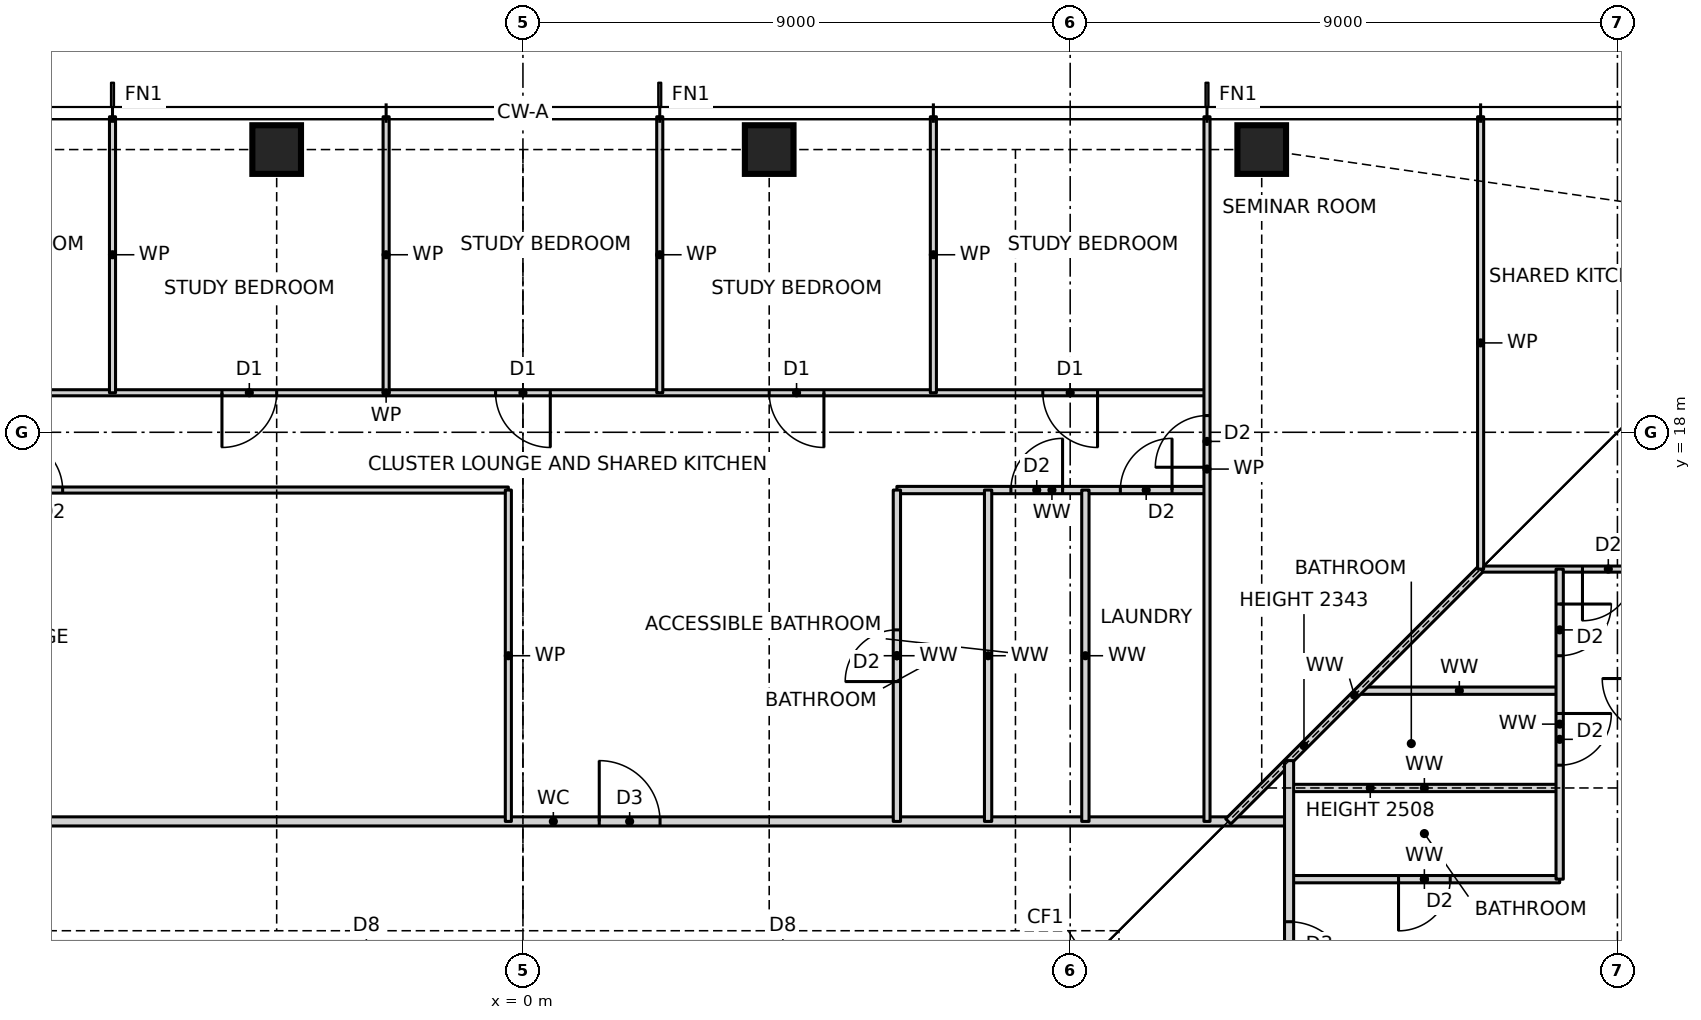
"""IFC4 building model, lengths in metres.
Left out: names, types, materials, properties, quantities, classifications, styles, units other than length and angle.
Written with IfcOpenShell. Run it as: python <this file> out.ifc"""

import sys

from ifc_helpers import new_model, si_unit, direction, frame, frame_2d, origin, origin_2d, place, context, subcontext, project, spatial, rectangle, hollow_rectangle, extrude, element, fill, save


model = new_model("IFC4")
c1 = context("Model", 3, precision=1e-05, world=origin(), true_north=direction((0.0, 1.0)))
c2 = subcontext(c1, "Body", "Model", "MODEL_VIEW")
j1 = project(units=[si_unit("LENGTHUNIT", "METRE"), si_unit("PLANEANGLEUNIT", "RADIAN")], contexts=[c1])
p1 = place(None, origin())
s1 = spatial("IfcSite", under=j1, at=p1, CompositionType="ELEMENT")
p2 = place(p1, origin())
s2 = spatial("IfcBuilding", under=s1, at=p2, CompositionType="ELEMENT")
p3 = place(p2, frame((0.0, 0.0, 29.0)))
s3 = spatial("IfcBuildingStorey", under=s2, at=p3, CompositionType="ELEMENT", Elevation=29.0)
for number, where, z_axis, x_axis in (
    (1, (12.15, 22.65, 0.0), (0.0, 0.0, 1.0), (1.0, 0.0, 0.0)),
    (2, (4.05, 22.65, 0.0), (0.0, 0.0, 1.0), (1.0, 0.0, 0.0)),
    (3, (-4.05, 22.65, 0.0), (0.0, 0.0, 1.0), (1.0, 0.0, 0.0)),
):
    element("IfcColumn", number, at=place(p3, frame(where, z_axis=z_axis, x_axis=x_axis)), inside=s3, PredefinedType="COLUMN", context=c2, shape_type="SweptSolid", body=[
        extrude(hollow_rectangle(XDim=0.8, YDim=0.8, WallThickness=0.09, at=origin_2d()), origin(), (0.0, 0.0, 1.0), 3.5),
    ])
p4 = place(p3, frame((12.6, 10.65, 0.0), z_axis=(0.0, 0.0, 1.0), x_axis=(1.0, 0.0, 0.0)))
e4 = element("IfcWall", 4, at=p4, inside=s3, PredefinedType="PARTITIONING", context=c2, shape_type="SweptSolid", body=[
    extrude(rectangle(XDim=4.45, YDim=0.12, at=frame_2d((2.225, 0.0))), origin(), (0.0, 0.0, 1.0), 3.27),
])
p5 = place(p4, frame((1.8, 0.0, 0.0)))
e5 = element("IfcOpeningElement", 5, at=p5, cuts=e4, PredefinedType="OPENING", context=c2, shape_type="SweptSolid", body=[
    extrude(rectangle(XDim=0.85, YDim=2.1, at=frame_2d((0.425, 1.05))), frame((0.0, 0.07, 0.0), z_axis=(0.0, -1.0, 0.0), x_axis=(1.0, 0.0, 0.0)), (0.0, 0.0, 1.0), 0.14),
])
p6 = place(p3, frame((-11.6, 11.6, 0.0), z_axis=(0.0, 0.0, 1.0), x_axis=(1.0, 0.0, 0.0)))
e6 = element("IfcWall", 6, at=p6, inside=s3, PredefinedType="PARTITIONING", context=c2, shape_type="SweptSolid", body=[
    extrude(rectangle(XDim=24.2, YDim=0.15, at=frame_2d((12.1, 0.0))), origin(), (0.0, 0.0, 1.0), 3.27),
])
p7 = place(p6, frame((12.855, 0.0, 0.0)))
e7 = element("IfcOpeningElement", 7, at=p7, cuts=e6, PredefinedType="OPENING", context=c2, shape_type="SweptSolid", body=[
    extrude(rectangle(XDim=1.0, YDim=2.1, at=frame_2d((0.5, 1.05))), frame((0.0, 0.085, 0.0), z_axis=(0.0, -1.0, 0.0), x_axis=(1.0, 0.0, 0.0)), (0.0, 0.0, 1.0), 0.17),
])
p8 = place(p3, frame((12.6, 12.15, 0.0), z_axis=(0.0, 0.0, 1.0), x_axis=(1.0, 0.0, 0.0)))
e8 = element("IfcWall", 8, at=p8, inside=s3, PredefinedType="PARTITIONING", context=c2, shape_type="SweptSolid", body=[
    extrude(rectangle(XDim=4.45, YDim=0.12, at=frame_2d((2.225, 0.0))), origin(), (0.0, 0.0, 1.0), 2.508),
])
p9 = place(p3, frame((13.75, 13.75, 0.0), z_axis=(0.0, 0.0, 1.0), x_axis=(1.0, 0.0, 0.0)))
e9 = element("IfcWall", 9, at=p9, inside=s3, PredefinedType="PARTITIONING", context=c2, shape_type="SweptSolid", body=[
    extrude(rectangle(XDim=3.3, YDim=0.12, at=frame_2d((1.65, 0.0))), origin(), (0.0, 0.0, 1.0), 3.27),
])
p10 = place(p3, frame((15.75, 15.75, 0.0), z_axis=(0.0, 0.0, 1.0), x_axis=(1.0, 0.0, 0.0)))
e10 = element("IfcWall", 10, at=p10, inside=s3, PredefinedType="PARTITIONING", context=c2, shape_type="SweptSolid", body=[
    extrude(rectangle(XDim=7.44, YDim=0.1, at=frame_2d((3.72, 0.0))), origin(), (0.0, 0.0, 1.0), 3.27),
])
p11 = place(p10, frame((1.675, 0.0, 0.0)))
e11 = element("IfcOpeningElement", 11, at=p11, cuts=e10, PredefinedType="OPENING", context=c2, shape_type="SweptSolid", body=[
    extrude(rectangle(XDim=0.85, YDim=2.1, at=frame_2d((0.425, 1.05))), frame((0.0, 0.06, 0.0), z_axis=(0.0, -1.0, 0.0), x_axis=(1.0, 0.0, 0.0)), (0.0, 0.0, 1.0), 0.12),
])
p12 = place(p3, frame((-15.75, 17.05, 0.0), z_axis=(0.0, 0.0, 1.0), x_axis=(1.0, 0.0, 0.0)))
e12 = element("IfcWall", 12, at=p12, inside=s3, PredefinedType="PARTITIONING", context=c2, shape_type="SweptSolid", body=[
    extrude(rectangle(XDim=15.51, YDim=0.1, at=frame_2d((7.755, 0.0))), origin(), (0.0, 0.0, 1.0), 3.27),
])
p13 = place(p12, frame((7.33, 0.0, 0.0)))
e13 = element("IfcOpeningElement", 13, at=p13, cuts=e12, PredefinedType="OPENING", context=c2, shape_type="SweptSolid", body=[
    extrude(rectangle(XDim=0.85, YDim=2.1, at=frame_2d((0.425, 1.05))), frame((0.0, 0.06, 0.0), z_axis=(0.0, -1.0, 0.0), x_axis=(1.0, 0.0, 0.0)), (0.0, 0.0, 1.0), 0.12),
])
p14 = place(p3, frame((6.15, 17.05, 0.0), z_axis=(0.0, 0.0, 1.0), x_axis=(1.0, 0.0, 0.0)))
e14 = element("IfcWall", 14, at=p14, inside=s3, PredefinedType="PARTITIONING", context=c2, shape_type="SweptSolid", body=[
    extrude(rectangle(XDim=5.1, YDim=0.12, at=frame_2d((2.55, 0.0))), origin(), (0.0, 0.0, 1.0), 3.27),
])
p15 = place(p14, frame((3.675, 0.0, 0.0)))
e15 = element("IfcOpeningElement", 15, at=p15, cuts=e14, PredefinedType="OPENING", context=c2, shape_type="SweptSolid", body=[
    extrude(rectangle(XDim=0.85, YDim=2.1, at=frame_2d((0.425, 1.05))), frame((0.0, 0.07, 0.0), z_axis=(0.0, -1.0, 0.0), x_axis=(1.0, 0.0, 0.0)), (0.0, 0.0, 1.0), 0.14),
])
p16 = place(p14, frame((1.875, 0.0, 0.0)))
e16 = element("IfcOpeningElement", 16, at=p16, cuts=e14, PredefinedType="OPENING", context=c2, shape_type="SweptSolid", body=[
    extrude(rectangle(XDim=0.85, YDim=2.1, at=frame_2d((0.425, 1.05))), frame((0.0, 0.07, 0.0), z_axis=(0.0, -1.0, 0.0), x_axis=(1.0, 0.0, 0.0)), (0.0, 0.0, 1.0), 0.14),
])
p17 = place(p3, frame((-15.75, 18.65, 0.0), z_axis=(0.0, 0.0, 1.0), x_axis=(1.0, 0.0, 0.0)))
e17 = element("IfcWall", 17, at=p17, inside=s3, PredefinedType="PARTITIONING", context=c2, shape_type="SweptSolid", body=[
    extrude(rectangle(XDim=27.0, YDim=0.1, at=frame_2d((13.5, 0.0))), origin(), (0.0, 0.0, 1.0), 3.27),
])
p18 = place(p17, frame((24.3, 0.0, 0.0)))
e18 = element("IfcOpeningElement", 18, at=p18, cuts=e17, PredefinedType="OPENING", context=c2, shape_type="SweptSolid", body=[
    extrude(rectangle(XDim=0.9, YDim=2.1, at=frame_2d((0.45, 1.05))), frame((0.0, 0.06, 0.0), z_axis=(0.0, -1.0, 0.0), x_axis=(1.0, 0.0, 0.0)), (0.0, 0.0, 1.0), 0.12),
])
p19 = place(p17, frame((19.8, 0.0, 0.0)))
e19 = element("IfcOpeningElement", 19, at=p19, cuts=e17, PredefinedType="OPENING", context=c2, shape_type="SweptSolid", body=[
    extrude(rectangle(XDim=0.9, YDim=2.1, at=frame_2d((0.45, 1.05))), frame((0.0, 0.06, 0.0), z_axis=(0.0, -1.0, 0.0), x_axis=(1.0, 0.0, 0.0)), (0.0, 0.0, 1.0), 0.12),
])
p20 = place(p17, frame((15.3, 0.0, 0.0)))
e20 = element("IfcOpeningElement", 20, at=p20, cuts=e17, PredefinedType="OPENING", context=c2, shape_type="SweptSolid", body=[
    extrude(rectangle(XDim=0.9, YDim=2.1, at=frame_2d((0.45, 1.05))), frame((0.0, 0.06, 0.0), z_axis=(0.0, -1.0, 0.0), x_axis=(1.0, 0.0, 0.0)), (0.0, 0.0, 1.0), 0.12),
])
p21 = place(p17, frame((10.8, 0.0, 0.0)))
e21 = element("IfcOpeningElement", 21, at=p21, cuts=e17, PredefinedType="OPENING", context=c2, shape_type="SweptSolid", body=[
    extrude(rectangle(XDim=0.9, YDim=2.1, at=frame_2d((0.45, 1.05))), frame((0.0, 0.06, 0.0), z_axis=(0.0, -1.0, 0.0), x_axis=(1.0, 0.0, 0.0)), (0.0, 0.0, 1.0), 0.12),
])
p22 = place(p17, frame((6.3, 0.0, 0.0)))
e22 = element("IfcOpeningElement", 22, at=p22, cuts=e17, PredefinedType="OPENING", context=c2, shape_type="SweptSolid", body=[
    extrude(rectangle(XDim=0.9, YDim=2.1, at=frame_2d((0.45, 1.05))), frame((0.0, 0.06, 0.0), z_axis=(0.0, -1.0, 0.0), x_axis=(1.0, 0.0, 0.0)), (0.0, 0.0, 1.0), 0.12),
])
p23 = place(p17, frame((1.8, 0.0, 0.0)))
e23 = element("IfcOpeningElement", 23, at=p23, cuts=e17, PredefinedType="OPENING", context=c2, shape_type="SweptSolid", body=[
    extrude(rectangle(XDim=0.9, YDim=2.1, at=frame_2d((0.45, 1.05))), frame((0.0, 0.06, 0.0), z_axis=(0.0, -1.0, 0.0), x_axis=(1.0, 0.0, 0.0)), (0.0, 0.0, 1.0), 0.12),
])
p24 = place(p3, frame((11.6, 11.6, 0.0), z_axis=(0.0, 0.0, 1.0), x_axis=(0.707106781187, 0.707106781187, 0.0)))
e24 = element("IfcWall", 24, at=p24, inside=s3, PredefinedType="PARTITIONING", context=c2, shape_type="SweptSolid", body=[
    extrude(rectangle(XDim=5.869, YDim=0.12, at=frame_2d((2.935, 0.0))), origin(), (0.0, 0.0, 1.0), 2.343),
])
p25 = place(p3, frame((17.05, 10.65, 0.0), z_axis=(0.0, 0.0, 1.0), x_axis=(0.0, 1.0, 0.0)))
e25 = element("IfcWall", 25, at=p25, inside=s3, PredefinedType="PARTITIONING", context=c2, shape_type="SweptSolid", body=[
    extrude(rectangle(XDim=5.1, YDim=0.12, at=frame_2d((2.55, 0.0))), origin(), (0.0, 0.0, 1.0), 3.27),
])
p26 = place(p25, frame((1.875, 0.0, 0.0)))
e26 = element("IfcOpeningElement", 26, at=p26, cuts=e25, PredefinedType="OPENING", context=c2, shape_type="SweptSolid", body=[
    extrude(rectangle(XDim=0.85, YDim=2.1, at=frame_2d((0.425, 1.05))), frame((0.0, 0.07, 0.0), z_axis=(0.0, -1.0, 0.0), x_axis=(1.0, 0.0, 0.0)), (0.0, 0.0, 1.0), 0.14),
])
p27 = place(p25, frame((3.675, 0.0, 0.0)))
e27 = element("IfcOpeningElement", 27, at=p27, cuts=e25, PredefinedType="OPENING", context=c2, shape_type="SweptSolid", body=[
    extrude(rectangle(XDim=0.85, YDim=2.1, at=frame_2d((0.425, 1.05))), frame((0.0, 0.07, 0.0), z_axis=(0.0, -1.0, 0.0), x_axis=(1.0, 0.0, 0.0)), (0.0, 0.0, 1.0), 0.14),
])
p28 = place(p3, frame((15.75, 15.75, 0.0), z_axis=(0.0, 0.0, 1.0), x_axis=(0.0, 1.0, 0.0)))
e28 = element("IfcWall", 28, at=p28, inside=s3, PredefinedType="PARTITIONING", context=c2, shape_type="SweptSolid", body=[
    extrude(rectangle(XDim=7.44, YDim=0.1, at=frame_2d((3.72, 0.0))), origin(), (0.0, 0.0, 1.0), 3.27),
])
p29 = place(p3, frame((12.6, -12.6, 0.0), z_axis=(0.0, 0.0, 1.0), x_axis=(0.0, 1.0, 0.0)))
e29 = element("IfcWall", 29, at=p29, inside=s3, PredefinedType="PARTITIONING", context=c2, shape_type="SweptSolid", body=[
    extrude(rectangle(XDim=25.2, YDim=0.15, at=frame_2d((12.6, 0.0))), origin(), (0.0, 0.0, 1.0), 3.27),
])
p30 = place(p29, frame((21.55, 0.0, 0.0)))
e30 = element("IfcOpeningElement", 30, at=p30, cuts=e29, PredefinedType="OPENING", context=c2, shape_type="SweptSolid", body=[
    extrude(rectangle(XDim=1.0, YDim=2.1, at=frame_2d((0.5, 1.05))), frame((0.0, 0.085, 0.0), z_axis=(0.0, -1.0, 0.0), x_axis=(1.0, 0.0, 0.0)), (0.0, 0.0, 1.0), 0.17),
])
p31 = place(p3, frame((11.25, 11.6, 0.0), z_axis=(0.0, 0.0, 1.0), x_axis=(0.0, 1.0, 0.0)))
e31 = element("IfcWall", 31, at=p31, inside=s3, PredefinedType="PARTITIONING", context=c2, shape_type="SweptSolid", body=[
    extrude(rectangle(XDim=11.59, YDim=0.1, at=frame_2d((5.795, 0.0))), origin(), (0.0, 0.0, 1.0), 3.27),
])
p32 = place(p31, frame((5.825, 0.0, 0.0)))
e32 = element("IfcOpeningElement", 32, at=p32, cuts=e31, PredefinedType="OPENING", context=c2, shape_type="SweptSolid", body=[
    extrude(rectangle(XDim=0.85, YDim=2.1, at=frame_2d((0.425, 1.05))), frame((0.0, 0.06, 0.0), z_axis=(0.0, -1.0, 0.0), x_axis=(1.0, 0.0, 0.0)), (0.0, 0.0, 1.0), 0.12),
])
for number, where, z_axis, x_axis in (
    (33, (9.25, 11.6, 0.0), (0.0, 0.0, 1.0), (0.0, 1.0, 0.0)),
    (34, (7.65, 11.6, 0.0), (0.0, 0.0, 1.0), (0.0, 1.0, 0.0)),
):
    element("IfcWall", number, at=place(p3, frame(where, z_axis=z_axis, x_axis=x_axis)), inside=s3, PredefinedType="PARTITIONING", context=c2, shape_type="SweptSolid", body=[
        extrude(rectangle(XDim=5.45, YDim=0.12, at=frame_2d((2.725, 0.0))), origin(), (0.0, 0.0, 1.0), 3.27),
    ])
p33 = place(p3, frame((6.75, 18.65, 0.0), z_axis=(0.0, 0.0, 1.0), x_axis=(0.0, 1.0, 0.0)))
e35 = element("IfcWall", 35, at=p33, inside=s3, PredefinedType="PARTITIONING", context=c2, shape_type="SweptSolid", body=[
    extrude(rectangle(XDim=4.54, YDim=0.1, at=frame_2d((2.27, 0.0))), origin(), (0.0, 0.0, 1.0), 3.27),
])
p34 = place(p3, frame((6.15, 11.6, 0.0), z_axis=(0.0, 0.0, 1.0), x_axis=(0.0, 1.0, 0.0)))
e36 = element("IfcWall", 36, at=p34, inside=s3, PredefinedType="PARTITIONING", context=c2, shape_type="SweptSolid", body=[
    extrude(rectangle(XDim=5.45, YDim=0.12, at=frame_2d((2.725, 0.0))), origin(), (0.0, 0.0, 1.0), 3.27),
])
p35 = place(p34, frame((2.3, 0.0, 0.0)))
e37 = element("IfcOpeningElement", 37, at=p35, cuts=e36, PredefinedType="OPENING", context=c2, shape_type="SweptSolid", body=[
    extrude(rectangle(XDim=0.85, YDim=2.1, at=frame_2d((0.425, 1.05))), frame((0.0, 0.07, 0.0), z_axis=(0.0, -1.0, 0.0), x_axis=(1.0, 0.0, 0.0)), (0.0, 0.0, 1.0), 0.14),
])
p36 = place(p3, frame((2.25, 18.65, 0.0), z_axis=(0.0, 0.0, 1.0), x_axis=(0.0, 1.0, 0.0)))
e38 = element("IfcWall", 38, at=p36, inside=s3, PredefinedType="PARTITIONING", context=c2, shape_type="SweptSolid", body=[
    extrude(rectangle(XDim=4.54, YDim=0.1, at=frame_2d((2.27, 0.0))), origin(), (0.0, 0.0, 1.0), 3.27),
])
p37 = place(p3, frame((-0.24, 11.6, 0.0), z_axis=(0.0, 0.0, 1.0), x_axis=(0.0, 1.0, 0.0)))
e39 = element("IfcWall", 39, at=p37, inside=s3, PredefinedType="PARTITIONING", context=c2, shape_type="SweptSolid", body=[
    extrude(rectangle(XDim=5.45, YDim=0.1, at=frame_2d((2.725, 0.0))), origin(), (0.0, 0.0, 1.0), 3.27),
])
for number, where, z_axis, x_axis in (
    (40, (-2.25, 18.65, 0.0), (0.0, 0.0, 1.0), (0.0, 1.0, 0.0)),
    (41, (-6.75, 18.65, 0.0), (0.0, 0.0, 1.0), (0.0, 1.0, 0.0)),
):
    element("IfcWall", number, at=place(p3, frame(where, z_axis=z_axis, x_axis=x_axis)), inside=s3, PredefinedType="PARTITIONING", context=c2, shape_type="SweptSolid", body=[
        extrude(rectangle(XDim=4.54, YDim=0.1, at=frame_2d((2.27, 0.0))), origin(), (0.0, 0.0, 1.0), 3.27),
    ])
p38 = place(p30, frame((1.0, 0.0, 0.0), z_axis=(0.0, 0.0, 1.0), x_axis=(-1.0, 0.0, 0.0)))
e42 = element("IfcDoor", 42, at=p38, inside=s3, OperationType="SINGLE_SWING_RIGHT", PredefinedType="DOOR", context=c2, shape_type="SweptSolid", body=[
    extrude(rectangle(XDim=1.0, YDim=2.1, at=frame_2d((0.5, 1.05))), frame((0.0, 0.025, 0.0), z_axis=(0.0, -1.0, 0.0), x_axis=(1.0, 0.0, 0.0)), (0.0, 0.0, 1.0), 0.05),
])
fill(e30, e42)
p39 = place(p5, frame((0.85, 0.0, 0.0), z_axis=(0.0, 0.0, 1.0), x_axis=(-1.0, 0.0, 0.0)))
e43 = element("IfcDoor", 43, at=p39, inside=s3, OperationType="SINGLE_SWING_RIGHT", PredefinedType="DOOR", context=c2, shape_type="SweptSolid", body=[
    extrude(rectangle(XDim=0.85, YDim=2.1, at=frame_2d((0.425, 1.05))), frame((0.0, 0.025, 0.0), z_axis=(0.0, -1.0, 0.0), x_axis=(1.0, 0.0, 0.0)), (0.0, 0.0, 1.0), 0.05),
])
fill(e5, e43)
p40 = place(p26, frame((0.85, 0.0, 0.0), z_axis=(0.0, 0.0, 1.0), x_axis=(-1.0, 0.0, 0.0)))
e44 = element("IfcDoor", 44, at=p40, inside=s3, OperationType="SINGLE_SWING_LEFT", PredefinedType="DOOR", context=c2, shape_type="SweptSolid", body=[
    extrude(rectangle(XDim=0.85, YDim=2.1, at=frame_2d((0.425, 1.05))), frame((0.0, 0.025, 0.0), z_axis=(0.0, -1.0, 0.0), x_axis=(1.0, 0.0, 0.0)), (0.0, 0.0, 1.0), 0.05),
])
fill(e26, e44)
p41 = place(p27, frame((0.85, 0.0, 0.0), z_axis=(0.0, 0.0, 1.0), x_axis=(-1.0, 0.0, 0.0)))
e45 = element("IfcDoor", 45, at=p41, inside=s3, OperationType="SINGLE_SWING_LEFT", PredefinedType="DOOR", context=c2, shape_type="SweptSolid", body=[
    extrude(rectangle(XDim=0.85, YDim=2.1, at=frame_2d((0.425, 1.05))), frame((0.0, 0.025, 0.0), z_axis=(0.0, -1.0, 0.0), x_axis=(1.0, 0.0, 0.0)), (0.0, 0.0, 1.0), 0.05),
])
fill(e27, e45)
p42 = place(p32, origin())
e46 = element("IfcDoor", 46, at=p42, inside=s3, OperationType="SINGLE_SWING_LEFT", PredefinedType="DOOR", context=c2, shape_type="SweptSolid", body=[
    extrude(rectangle(XDim=0.85, YDim=2.1, at=frame_2d((0.425, 1.05))), frame((0.0, 0.025, 0.0), z_axis=(0.0, -1.0, 0.0), x_axis=(1.0, 0.0, 0.0)), (0.0, 0.0, 1.0), 0.05),
])
fill(e32, e46)
p43 = place(p18, frame((0.9, 0.0, 0.0), z_axis=(0.0, 0.0, 1.0), x_axis=(-1.0, 0.0, 0.0)))
e47 = element("IfcDoor", 47, at=p43, inside=s3, OperationType="SINGLE_SWING_LEFT", PredefinedType="DOOR", context=c2, shape_type="SweptSolid", body=[
    extrude(rectangle(XDim=0.9, YDim=2.1, at=frame_2d((0.45, 1.05))), frame((0.0, 0.025, 0.0), z_axis=(0.0, -1.0, 0.0), x_axis=(1.0, 0.0, 0.0)), (0.0, 0.0, 1.0), 0.05),
])
fill(e18, e47)
p44 = place(p19, frame((0.9, 0.0, 0.0), z_axis=(0.0, 0.0, 1.0), x_axis=(-1.0, 0.0, 0.0)))
e48 = element("IfcDoor", 48, at=p44, inside=s3, OperationType="SINGLE_SWING_LEFT", PredefinedType="DOOR", context=c2, shape_type="SweptSolid", body=[
    extrude(rectangle(XDim=0.9, YDim=2.1, at=frame_2d((0.45, 1.05))), frame((0.0, 0.025, 0.0), z_axis=(0.0, -1.0, 0.0), x_axis=(1.0, 0.0, 0.0)), (0.0, 0.0, 1.0), 0.05),
])
fill(e19, e48)
p45 = place(p20, frame((0.9, 0.0, 0.0), z_axis=(0.0, 0.0, 1.0), x_axis=(-1.0, 0.0, 0.0)))
e49 = element("IfcDoor", 49, at=p45, inside=s3, OperationType="SINGLE_SWING_LEFT", PredefinedType="DOOR", context=c2, shape_type="SweptSolid", body=[
    extrude(rectangle(XDim=0.9, YDim=2.1, at=frame_2d((0.45, 1.05))), frame((0.0, 0.025, 0.0), z_axis=(0.0, -1.0, 0.0), x_axis=(1.0, 0.0, 0.0)), (0.0, 0.0, 1.0), 0.05),
])
fill(e20, e49)
p46 = place(p21, frame((0.9, 0.0, 0.0), z_axis=(0.0, 0.0, 1.0), x_axis=(-1.0, 0.0, 0.0)))
e50 = element("IfcDoor", 50, at=p46, inside=s3, OperationType="SINGLE_SWING_RIGHT", PredefinedType="DOOR", context=c2, shape_type="SweptSolid", body=[
    extrude(rectangle(XDim=0.9, YDim=2.1, at=frame_2d((0.45, 1.05))), frame((0.0, 0.025, 0.0), z_axis=(0.0, -1.0, 0.0), x_axis=(1.0, 0.0, 0.0)), (0.0, 0.0, 1.0), 0.05),
])
fill(e21, e50)
p47 = place(p7, origin())
e51 = element("IfcDoor", 51, at=p47, inside=s3, OperationType="SINGLE_SWING_LEFT", PredefinedType="DOOR", context=c2, shape_type="SweptSolid", body=[
    extrude(rectangle(XDim=1.0, YDim=2.1, at=frame_2d((0.5, 1.05))), frame((0.0, 0.025, 0.0), z_axis=(0.0, -1.0, 0.0), x_axis=(1.0, 0.0, 0.0)), (0.0, 0.0, 1.0), 0.05),
])
fill(e7, e51)
p48 = place(p15, origin())
e52 = element("IfcDoor", 52, at=p48, inside=s3, OperationType="SINGLE_SWING_RIGHT", PredefinedType="DOOR", context=c2, shape_type="SweptSolid", body=[
    extrude(rectangle(XDim=0.85, YDim=2.1, at=frame_2d((0.425, 1.05))), frame((0.0, 0.025, 0.0), z_axis=(0.0, -1.0, 0.0), x_axis=(1.0, 0.0, 0.0)), (0.0, 0.0, 1.0), 0.05),
])
fill(e15, e52)
p49 = place(p16, origin())
e53 = element("IfcDoor", 53, at=p49, inside=s3, OperationType="SINGLE_SWING_RIGHT", PredefinedType="DOOR", context=c2, shape_type="SweptSolid", body=[
    extrude(rectangle(XDim=0.85, YDim=2.1, at=frame_2d((0.425, 1.05))), frame((0.0, 0.025, 0.0), z_axis=(0.0, -1.0, 0.0), x_axis=(1.0, 0.0, 0.0)), (0.0, 0.0, 1.0), 0.05),
])
fill(e16, e53)
p50 = place(p35, origin())
e54 = element("IfcDoor", 54, at=p50, inside=s3, OperationType="SINGLE_SWING_LEFT", PredefinedType="DOOR", context=c2, shape_type="SweptSolid", body=[
    extrude(rectangle(XDim=0.85, YDim=2.1, at=frame_2d((0.425, 1.05))), frame((0.0, 0.025, 0.0), z_axis=(0.0, -1.0, 0.0), x_axis=(1.0, 0.0, 0.0)), (0.0, 0.0, 1.0), 0.05),
])
fill(e37, e54)
p51 = place(p13, origin())
e55 = element("IfcDoor", 55, at=p51, inside=s3, OperationType="SINGLE_SWING_LEFT", PredefinedType="DOOR", context=c2, shape_type="SweptSolid", body=[
    extrude(rectangle(XDim=0.85, YDim=2.1, at=frame_2d((0.425, 1.05))), frame((0.0, 0.025, 0.0), z_axis=(0.0, -1.0, 0.0), x_axis=(1.0, 0.0, 0.0)), (0.0, 0.0, 1.0), 0.05),
])
fill(e13, e55)
p52 = place(p11, frame((0.85, 0.0, 0.0), z_axis=(0.0, 0.0, 1.0), x_axis=(-1.0, 0.0, 0.0)))
e56 = element("IfcDoor", 56, at=p52, inside=s3, OperationType="SINGLE_SWING_RIGHT", PredefinedType="DOOR", context=c2, shape_type="SweptSolid", body=[
    extrude(rectangle(XDim=0.85, YDim=2.1, at=frame_2d((0.425, 1.05))), frame((0.0, 0.025, 0.0), z_axis=(0.0, -1.0, 0.0), x_axis=(1.0, 0.0, 0.0)), (0.0, 0.0, 1.0), 0.05),
])
fill(e11, e56)
save(model, sys.argv[1])
